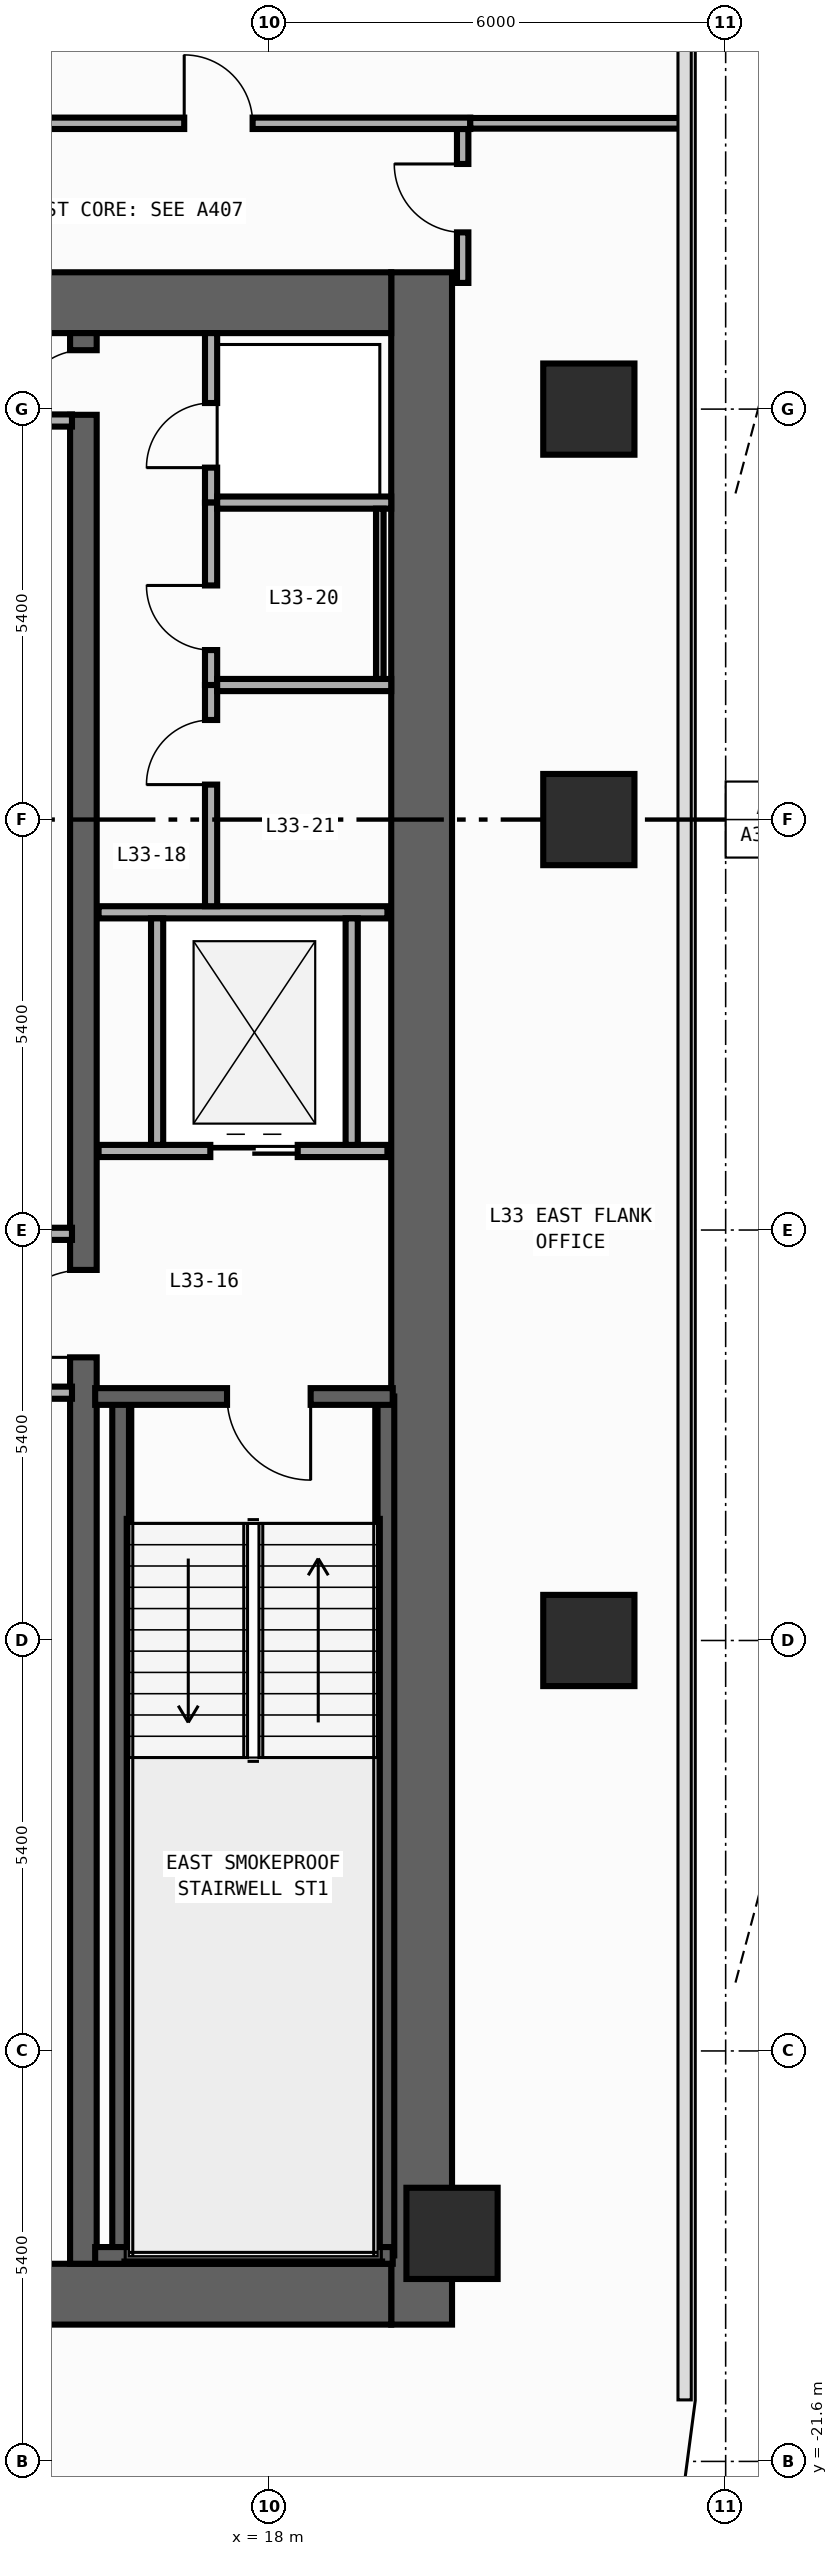
"""IFC4 building model, lengths in metres.
Left out: names, types, materials, properties, quantities, classifications, styles, units other than length and angle.
Written with IfcOpenShell. Run it as: python <this file> out.ifc"""

import sys

from ifc_helpers import new_model, si_unit, direction, frame, frame_2d, origin, origin_2d, place, context, subcontext, project, spatial, rectangle, extrude, element, fill, save


model = new_model("IFC4")
c1 = context("Model", 3, precision=1e-05, world=origin(), true_north=direction((0.0, 1.0)))
c2 = subcontext(c1, "Body", "Model", "MODEL_VIEW")
j1 = project(units=[si_unit("LENGTHUNIT", "METRE"), si_unit("PLANEANGLEUNIT", "RADIAN")], contexts=[c1])
p1 = place(None, origin())
s1 = spatial("IfcSite", under=j1, at=p1, CompositionType="ELEMENT")
p2 = place(p1, origin())
s2 = spatial("IfcBuilding", under=s1, at=p2, CompositionType="ELEMENT")
p3 = place(p2, frame((0.0, 0.0, 143.6)))
s3 = spatial("IfcBuildingStorey", under=s2, at=p3, CompositionType="ELEMENT", Elevation=143.6)
p4 = place(p3, frame((20.0, -19.8, 0.0), z_axis=(0.0, 0.0, 1.0), x_axis=(0.0, 1.0, 0.0)))
e1 = element("IfcWall", 1, at=p4, inside=s3, PredefinedType="SHEAR", context=c2, shape_type="SweptSolid", body=[
    extrude(rectangle(XDim=27.0, YDim=0.8, at=frame_2d((13.5, 0.0))), origin(), (0.0, 0.0, 1.0), 3.94),
])
for number, where, z_axis, x_axis in (
    (2, (12.8, -19.4, 0.0), (0.0, 0.0, 1.0), (1.0, 0.0, 0.0)),
    (3, (12.8, 6.8, 0.0), (0.0, 0.0, 1.0), (1.0, 0.0, 0.0)),
):
    element("IfcWall", number, at=place(p3, frame(where, z_axis=z_axis, x_axis=x_axis)), inside=s3, PredefinedType="SHEAR", context=c2, shape_type="SweptSolid", body=[
        extrude(rectangle(XDim=6.8, YDim=0.8, at=frame_2d((3.4, 0.0))), origin(), (0.0, 0.0, 1.0), 3.94),
    ])
p5 = place(p3, frame((15.55, -19.0, 0.0), z_axis=(0.0, 0.0, 1.0), x_axis=(0.0, 1.0, 0.0)))
e4 = element("IfcWall", 4, at=p5, inside=s3, PredefinedType="SHEAR", context=c2, shape_type="SweptSolid", body=[
    extrude(rectangle(XDim=25.4, YDim=0.35, at=frame_2d((12.7, 0.0))), origin(), (0.0, 0.0, 1.0), 3.94),
])
p6 = place(p5, frame((11.925, 0.0, 0.0)))
e5 = element("IfcOpeningElement", 5, at=p6, cuts=e4, PredefinedType="OPENING", context=c2, shape_type="SweptSolid", body=[
    extrude(rectangle(XDim=1.15, YDim=2.2, at=frame_2d((0.575, 1.1))), frame((0.0, 0.185, 0.0), z_axis=(0.0, -1.0, 0.0), x_axis=(1.0, 0.0, 0.0)), (0.0, 0.0, 1.0), 0.37),
])
p7 = place(p5, frame((24.325, 0.0, 0.0)))
e6 = element("IfcOpeningElement", 6, at=p7, cuts=e4, PredefinedType="OPENING", context=c2, shape_type="SweptSolid", body=[
    extrude(rectangle(XDim=0.85, YDim=2.1, at=frame_2d((0.425, 1.05))), frame((0.0, 0.185, 0.0), z_axis=(0.0, -1.0, 0.0), x_axis=(1.0, 0.0, 0.0)), (0.0, 0.0, 1.0), 0.37),
])
for number, where, z_axis, x_axis in (
    (7, (16.04, -18.89, 0.0), (0.0, 0.0, 1.0), (0.0, 1.0, 0.0)),
    (8, (19.53, -18.89, 0.0), (0.0, 0.0, 1.0), (0.0, 1.0, 0.0)),
):
    element("IfcWall", number, at=place(p3, frame(where, z_axis=z_axis, x_axis=x_axis)), inside=s3, PredefinedType="SHEAR", context=c2, shape_type="SweptSolid", body=[
        extrude(rectangle(XDim=11.3, YDim=0.22, at=frame_2d((5.65, 0.0))), origin(), (0.0, 0.0, 1.0), 3.94),
    ])
p8 = place(p3, frame((15.705, -18.89, 0.0), z_axis=(0.0, 0.0, 1.0), x_axis=(1.0, 0.0, 0.0)))
e9 = element("IfcWall", 9, at=p8, inside=s3, PredefinedType="SHEAR", context=c2, shape_type="SweptSolid", body=[
    extrude(rectangle(XDim=3.915, YDim=0.22, at=frame_2d((1.958, 0.0))), origin(), (0.0, 0.0, 1.0), 3.94),
])
p9 = place(p3, frame((19.62, -7.59, 0.0), z_axis=(0.0, 0.0, 1.0), x_axis=(-1.0, 0.0, 0.0)))
e10 = element("IfcWall", 10, at=p9, inside=s3, PredefinedType="SHEAR", context=c2, shape_type="SweptSolid", body=[
    extrude(rectangle(XDim=3.915, YDim=0.22, at=frame_2d((1.958, 0.0))), origin(), (0.0, 0.0, 1.0), 3.94),
])
p10 = place(p9, frame((1.08, 0.0, 0.0)))
e11 = element("IfcOpeningElement", 11, at=p10, cuts=e10, PredefinedType="OPENING", context=c2, shape_type="SweptSolid", body=[
    extrude(rectangle(XDim=1.1, YDim=2.2, at=frame_2d((0.55, 1.1))), frame((0.0, 0.12, 0.0), z_axis=(0.0, -1.0, 0.0), x_axis=(1.0, 0.0, 0.0)), (0.0, 0.0, 1.0), 0.24),
])
for number, where, z_axis, x_axis in (
    (12, (20.4, -18.6, 0.0), (0.0, 0.0, 1.0), (1.0, 0.0, 0.0)),
    (13, (22.2, -10.8, 0.0), (0.0, 0.0, 1.0), (1.0, 0.0, 0.0)),
    (14, (22.2, 0.0, 0.0), (0.0, 0.0, 1.0), (1.0, 0.0, 0.0)),
    (15, (22.2, 5.4, 0.0), (0.0, 0.0, 1.0), (1.0, 0.0, 0.0)),
):
    element("IfcColumn", number, at=place(p3, frame(where, z_axis=z_axis, x_axis=x_axis)), inside=s3, PredefinedType="COLUMN", context=c2, shape_type="SweptSolid", body=[
        extrude(rectangle(XDim=1.2, YDim=1.2, at=origin_2d()), origin(), (0.0, 0.0, 1.0), 4.2),
    ])
p11 = place(p3, frame((15.75, -4.36, 0.0), z_axis=(0.0, 0.0, 1.0), x_axis=(1.0, 0.0, 0.0)))
e16 = element("IfcWall", 16, at=p11, inside=s3, PredefinedType="STANDARD", context=c2, shape_type="SweptSolid", body=[
    extrude(rectangle(XDim=3.8, YDim=0.16, at=frame_2d((1.9, 0.0))), origin(), (0.0, 0.0, 1.0), 3.94),
])
p12 = place(p11, frame((1.47, 0.0, 0.0)))
e17 = element("IfcOpeningElement", 17, at=p12, cuts=e16, PredefinedType="OPENING", context=c2, shape_type="SweptSolid", body=[
    extrude(rectangle(XDim=1.15, YDim=2.2, at=frame_2d((0.575, 1.1))), frame((0.0, 0.09, 0.0), z_axis=(0.0, -1.0, 0.0), x_axis=(1.0, 0.0, 0.0)), (0.0, 0.0, 1.0), 0.18),
])
p13 = place(p3, frame((15.75, -1.22, 0.0), z_axis=(0.0, 0.0, 1.0), x_axis=(1.0, 0.0, 0.0)))
e18 = element("IfcWall", 18, at=p13, inside=s3, PredefinedType="STANDARD", context=c2, shape_type="SweptSolid", body=[
    extrude(rectangle(XDim=3.8, YDim=0.16, at=frame_2d((1.9, 0.0))), origin(), (0.0, 0.0, 1.0), 3.94),
])
for number, where, z_axis, x_axis in (
    (19, (16.52, -4.28, 0.0), (0.0, 0.0, 1.0), (0.0, 1.0, 0.0)),
    (20, (19.08, -4.28, 0.0), (0.0, 0.0, 1.0), (0.0, 1.0, 0.0)),
):
    element("IfcWall", number, at=place(p3, frame(where, z_axis=z_axis, x_axis=x_axis)), inside=s3, PredefinedType="STANDARD", context=c2, shape_type="SweptSolid", body=[
        extrude(rectangle(XDim=2.98, YDim=0.16, at=frame_2d((1.49, 0.0))), origin(), (0.0, 0.0, 1.0), 3.94),
    ])
for number, where, z_axis, x_axis in (
    (21, (12.8, -5.45, 0.0), (0.0, 0.0, 1.0), (1.0, 0.0, 0.0)),
    (22, (12.8, -7.54, 0.0), (0.0, 0.0, 1.0), (1.0, 0.0, 0.0)),
    (23, (12.8, 5.25, 0.0), (0.0, 0.0, 1.0), (1.0, 0.0, 0.0)),
):
    element("IfcWall", number, at=place(p3, frame(where, z_axis=z_axis, x_axis=x_axis)), inside=s3, PredefinedType="STANDARD", context=c2, shape_type="SweptSolid", body=[
        extrude(rectangle(XDim=2.6, YDim=0.16, at=frame_2d((1.3, 0.0))), origin(), (0.0, 0.0, 1.0), 3.94),
    ])
p14 = place(p3, frame((17.23, 4.17, 0.0), z_axis=(0.0, 0.0, 1.0), x_axis=(0.0, 1.0, 0.0)))
e24 = element("IfcWall", 24, at=p14, inside=s3, PredefinedType="PARTITIONING", context=c2, shape_type="SweptSolid", body=[
    extrude(rectangle(XDim=2.23, YDim=0.16, at=frame_2d((1.115, 0.0))), origin(), (0.0, 0.0, 1.0), 3.94),
])
p15 = place(p14, frame((0.46, 0.0, 0.0)))
e25 = element("IfcOpeningElement", 25, at=p15, cuts=e24, PredefinedType="OPENING", context=c2, shape_type="SweptSolid", body=[
    extrude(rectangle(XDim=0.85, YDim=2.1, at=frame_2d((0.425, 1.05))), frame((0.0, 0.09, 0.0), z_axis=(0.0, -1.0, 0.0), x_axis=(1.0, 0.0, 0.0)), (0.0, 0.0, 1.0), 0.18),
])
p16 = place(p3, frame((17.23, 1.77, 0.0), z_axis=(0.0, 0.0, 1.0), x_axis=(0.0, 1.0, 0.0)))
e26 = element("IfcWall", 26, at=p16, inside=s3, PredefinedType="PARTITIONING", context=c2, shape_type="SweptSolid", body=[
    extrude(rectangle(XDim=2.4, YDim=0.16, at=frame_2d((1.2, 0.0))), origin(), (0.0, 0.0, 1.0), 3.94),
])
p17 = place(p16, frame((0.46, 0.0, 0.0)))
e27 = element("IfcOpeningElement", 27, at=p17, cuts=e26, PredefinedType="OPENING", context=c2, shape_type="SweptSolid", body=[
    extrude(rectangle(XDim=0.85, YDim=2.1, at=frame_2d((0.425, 1.05))), frame((0.0, 0.09, 0.0), z_axis=(0.0, -1.0, 0.0), x_axis=(1.0, 0.0, 0.0)), (0.0, 0.0, 1.0), 0.18),
])
p18 = place(p3, frame((17.23, -1.14, 0.0), z_axis=(0.0, 0.0, 1.0), x_axis=(0.0, 1.0, 0.0)))
e28 = element("IfcWall", 28, at=p18, inside=s3, PredefinedType="PARTITIONING", context=c2, shape_type="SweptSolid", body=[
    extrude(rectangle(XDim=2.91, YDim=0.16, at=frame_2d((1.455, 0.0))), origin(), (0.0, 0.0, 1.0), 3.94),
])
p19 = place(p18, frame((1.6, 0.0, 0.0)))
e29 = element("IfcOpeningElement", 29, at=p19, cuts=e28, PredefinedType="OPENING", context=c2, shape_type="SweptSolid", body=[
    extrude(rectangle(XDim=0.85, YDim=2.1, at=frame_2d((0.425, 1.05))), frame((0.0, 0.09, 0.0), z_axis=(0.0, -1.0, 0.0), x_axis=(1.0, 0.0, 0.0)), (0.0, 0.0, 1.0), 0.18),
])
for number, where, z_axis, x_axis in (
    (30, (17.31, 4.17, 0.0), (0.0, 0.0, 1.0), (1.0, 0.0, 0.0)),
    (31, (17.31, 1.77, 0.0), (0.0, 0.0, 1.0), (1.0, 0.0, 0.0)),
):
    element("IfcWall", number, at=place(p3, frame(where, z_axis=z_axis, x_axis=x_axis)), inside=s3, PredefinedType="PARTITIONING", context=c2, shape_type="SweptSolid", body=[
        extrude(rectangle(XDim=2.29, YDim=0.16, at=frame_2d((1.145, 0.0))), origin(), (0.0, 0.0, 1.0), 3.94),
    ])
p20 = place(p3, frame((20.54, 7.06, 0.0), z_axis=(0.0, 0.0, 1.0), x_axis=(0.0, 1.0, 0.0)))
e32 = element("IfcWall", 32, at=p20, inside=s3, PredefinedType="PARTITIONING", context=c2, shape_type="SweptSolid", body=[
    extrude(rectangle(XDim=2.025, YDim=0.15, at=frame_2d((1.012, 0.0))), origin(), (0.0, 0.0, 1.0), 3.94),
])
p21 = place(p20, frame((0.665, 0.0, 0.0)))
e33 = element("IfcOpeningElement", 33, at=p21, cuts=e32, PredefinedType="OPENING", context=c2, shape_type="SweptSolid", body=[
    extrude(rectangle(XDim=0.9, YDim=2.15, at=frame_2d((0.45, 1.075))), frame((0.0, 0.085, 0.0), z_axis=(0.0, -1.0, 0.0), x_axis=(1.0, 0.0, 0.0)), (0.0, 0.0, 1.0), 0.17),
])
p22 = place(p3, frame((11.81, 9.16, 0.0), z_axis=(0.0, 0.0, 1.0), x_axis=(1.0, 0.0, 0.0)))
e34 = element("IfcWall", 34, at=p22, inside=s3, PredefinedType="PARTITIONING", context=c2, shape_type="SweptSolid", body=[
    extrude(rectangle(XDim=8.83, YDim=0.15, at=frame_2d((4.415, 0.0))), origin(), (0.0, 0.0, 1.0), 3.94),
])
p23 = place(p22, frame((5.067, 0.0, 0.0)))
e35 = element("IfcOpeningElement", 35, at=p23, cuts=e34, PredefinedType="OPENING", context=c2, shape_type="SweptSolid", body=[
    extrude(rectangle(XDim=0.9, YDim=2.15, at=frame_2d((0.45, 1.075))), frame((0.0, 0.085, 0.0), z_axis=(0.0, -1.0, 0.0), x_axis=(1.0, 0.0, 0.0)), (0.0, 0.0, 1.0), 0.17),
])
p24 = place(p3, frame((20.64, 9.16, 0.0), z_axis=(0.0, 0.0, 1.0), x_axis=(1.0, 0.0, 0.0)))
e36 = element("IfcWall", 36, at=p24, inside=s3, PredefinedType="PARTITIONING", context=c2, shape_type="SweptSolid", body=[
    extrude(rectangle(XDim=2.815, YDim=0.14, at=frame_2d((1.408, 0.0))), origin(), (0.0, 0.0, 1.0), 3.94),
])
p25 = place(p3, frame((19.45, 4.09, 0.0), z_axis=(0.0, 0.0, 1.0), x_axis=(0.0, -1.0, 0.0)))
e37 = element("IfcWall", 37, at=p25, inside=s3, PredefinedType="PARTITIONING", context=c2, shape_type="SweptSolid", body=[
    extrude(rectangle(XDim=2.24, YDim=0.1, at=frame_2d((1.12, 0.0))), origin(), (0.0, 0.0, 1.0), 3.94),
])
p26 = place(p10, origin())
e38 = element("IfcDoor", 38, at=p26, inside=s3, OperationType="SINGLE_SWING_LEFT", PredefinedType="DOOR", context=c2, shape_type="SweptSolid", body=[
    extrude(rectangle(XDim=1.1, YDim=2.2, at=frame_2d((0.55, 1.1))), frame((0.0, 0.025, 0.0), z_axis=(0.0, -1.0, 0.0), x_axis=(1.0, 0.0, 0.0)), (0.0, 0.0, 1.0), 0.05),
])
fill(e11, e38)
p27 = place(p6, origin())
e39 = element("IfcDoor", 39, at=p27, inside=s3, OperationType="SINGLE_SWING_LEFT", PredefinedType="DOOR", context=c2, shape_type="SweptSolid", body=[
    extrude(rectangle(XDim=1.15, YDim=2.2, at=frame_2d((0.575, 1.1))), frame((0.0, 0.025, 0.0), z_axis=(0.0, -1.0, 0.0), x_axis=(1.0, 0.0, 0.0)), (0.0, 0.0, 1.0), 0.05),
])
fill(e5, e39)
p28 = place(p7, origin())
e40 = element("IfcDoor", 40, at=p28, inside=s3, OperationType="SINGLE_SWING_LEFT", PredefinedType="DOOR", context=c2, shape_type="SweptSolid", body=[
    extrude(rectangle(XDim=0.85, YDim=2.1, at=frame_2d((0.425, 1.05))), frame((0.0, 0.025, 0.0), z_axis=(0.0, -1.0, 0.0), x_axis=(1.0, 0.0, 0.0)), (0.0, 0.0, 1.0), 0.05),
])
fill(e6, e40)
p29 = place(p12, origin())
e41 = element("IfcDoor", 41, at=p29, inside=s3, OperationType="DOUBLE_DOOR_SLIDING", PredefinedType="DOOR", context=c2, shape_type="SweptSolid", body=[
    extrude(rectangle(XDim=1.15, YDim=2.2, at=frame_2d((0.575, 1.1))), frame((0.0, 0.025, 0.0), z_axis=(0.0, -1.0, 0.0), x_axis=(1.0, 0.0, 0.0)), (0.0, 0.0, 1.0), 0.05),
])
fill(e17, e41)
p30 = place(p15, origin())
e42 = element("IfcDoor", 42, at=p30, inside=s3, OperationType="SINGLE_SWING_LEFT", PredefinedType="DOOR", context=c2, shape_type="SweptSolid", body=[
    extrude(rectangle(XDim=0.85, YDim=2.1, at=frame_2d((0.425, 1.05))), frame((0.0, 0.025, 0.0), z_axis=(0.0, -1.0, 0.0), x_axis=(1.0, 0.0, 0.0)), (0.0, 0.0, 1.0), 0.05),
])
fill(e25, e42)
p31 = place(p17, origin())
e43 = element("IfcDoor", 43, at=p31, inside=s3, OperationType="SINGLE_SWING_RIGHT", PredefinedType="DOOR", context=c2, shape_type="SweptSolid", body=[
    extrude(rectangle(XDim=0.85, YDim=2.1, at=frame_2d((0.425, 1.05))), frame((0.0, 0.025, 0.0), z_axis=(0.0, -1.0, 0.0), x_axis=(1.0, 0.0, 0.0)), (0.0, 0.0, 1.0), 0.05),
])
fill(e27, e43)
p32 = place(p19, origin())
e44 = element("IfcDoor", 44, at=p32, inside=s3, OperationType="SINGLE_SWING_LEFT", PredefinedType="DOOR", context=c2, shape_type="SweptSolid", body=[
    extrude(rectangle(XDim=0.85, YDim=2.1, at=frame_2d((0.425, 1.05))), frame((0.0, 0.025, 0.0), z_axis=(0.0, -1.0, 0.0), x_axis=(1.0, 0.0, 0.0)), (0.0, 0.0, 1.0), 0.05),
])
fill(e29, e44)
p33 = place(p21, origin())
e45 = element("IfcDoor", 45, at=p33, inside=s3, OperationType="SINGLE_SWING_RIGHT", PredefinedType="DOOR", context=c2, shape_type="SweptSolid", body=[
    extrude(rectangle(XDim=0.9, YDim=2.15, at=frame_2d((0.45, 1.075))), frame((0.0, 0.025, 0.0), z_axis=(0.0, -1.0, 0.0), x_axis=(1.0, 0.0, 0.0)), (0.0, 0.0, 1.0), 0.05),
])
fill(e33, e45)
p34 = place(p23, origin())
e46 = element("IfcDoor", 46, at=p34, inside=s3, OperationType="SINGLE_SWING_LEFT", PredefinedType="DOOR", context=c2, shape_type="SweptSolid", body=[
    extrude(rectangle(XDim=0.9, YDim=2.15, at=frame_2d((0.45, 1.075))), frame((0.0, 0.025, 0.0), z_axis=(0.0, -1.0, 0.0), x_axis=(1.0, 0.0, 0.0)), (0.0, 0.0, 1.0), 0.05),
])
fill(e35, e46)
save(model, sys.argv[1])
